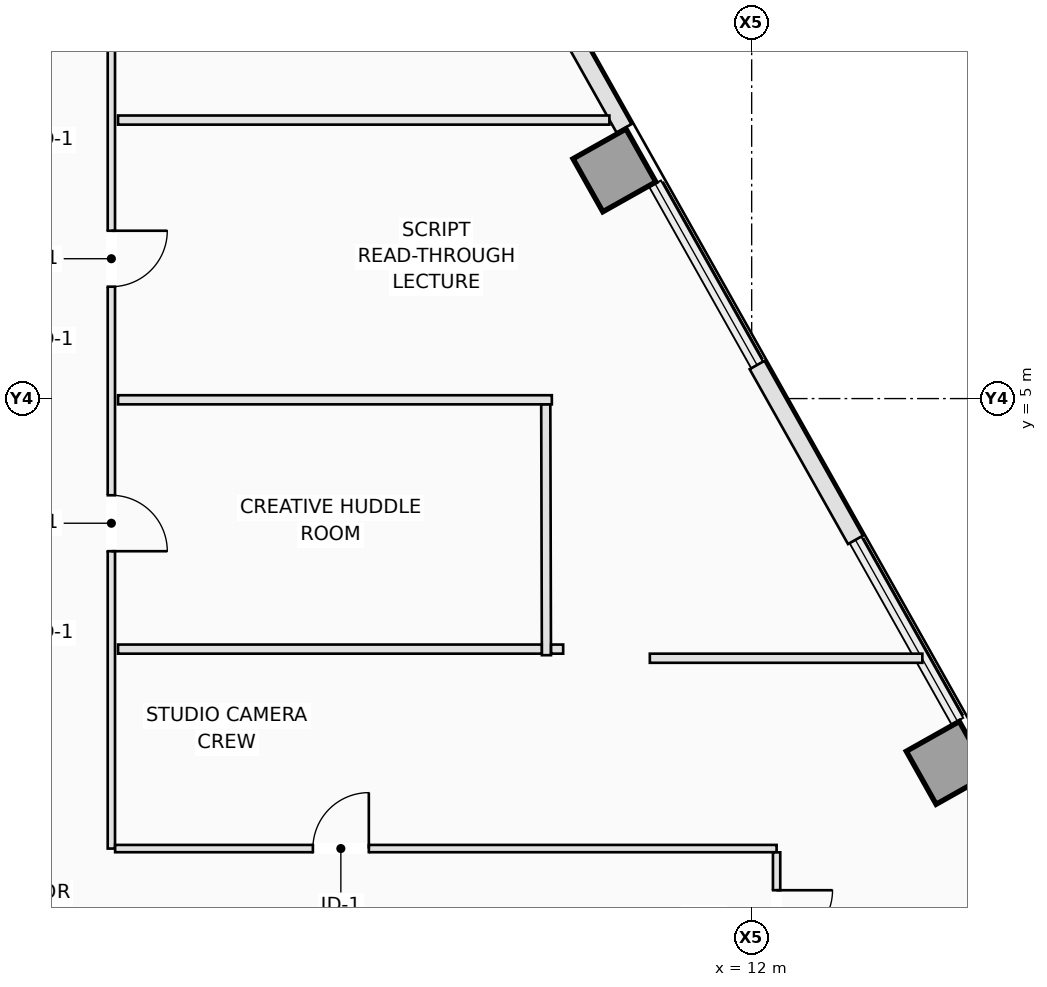
"""IFC4 building model, lengths in metres.
Left out: names, types, materials, properties, quantities, classifications, styles, units other than length and angle.
Written with IfcOpenShell. Run it as: python <this file> out.ifc"""

import sys

from ifc_helpers import new_model, si_unit, direction, frame, frame_2d, origin, origin_2d, place, context, subcontext, project, spatial, rectangle, extrude, element, fill, save


model = new_model("IFC4")
c1 = context("Model", 3, precision=1e-05, world=origin(), true_north=direction((0.0, 1.0)))
c2 = subcontext(c1, "Body", "Model", "MODEL_VIEW")
j1 = project(units=[si_unit("LENGTHUNIT", "METRE"), si_unit("PLANEANGLEUNIT", "RADIAN")], contexts=[c1])
p1 = place(None, origin())
s1 = spatial("IfcSite", under=j1, at=p1, CompositionType="ELEMENT")
p2 = place(p1, origin())
s2 = spatial("IfcBuilding", under=s1, at=p2, CompositionType="ELEMENT")
p3 = place(p2, frame((0.0, 0.0, 133.5)))
s3 = spatial("IfcBuildingStorey", under=s2, at=p3, CompositionType="ELEMENT", Elevation=133.5)
for number, where, z_axis, x_axis in (
    (1, (15.224, -0.991, 0.0), (0.0, 0.0, 1.0), (0.872, 0.49, 0.0)),
    (2, (9.743, 8.753, 0.0), (0.0, 0.0, 1.0), (0.872, 0.49, 0.0)),
):
    element("IfcColumn", number, at=place(p3, frame(where, z_axis=z_axis, x_axis=x_axis)), inside=s3, PredefinedType="COLUMN", context=c2, shape_type="SweptSolid", body=[
        extrude(rectangle(XDim=1.0, YDim=1.0, at=origin_2d()), origin(), (0.0, 0.0, 1.0), 3.5),
    ])
p4 = place(p3, frame((8.641, 11.682, 0.0), z_axis=(0.0, 0.0, 1.0), x_axis=(0.490301864627, -0.871552684319, 0.0)))
e3 = element("IfcWall", 3, at=p4, inside=s3, PredefinedType="STANDARD", context=c2, shape_type="SweptSolid", body=[
    extrude(rectangle(XDim=2.568, YDim=0.28, at=frame_2d((1.284, 0.0))), origin(), (0.0, 0.0, 1.0), 3.25),
])
p5 = place(p3, frame((12.089, 5.552, 0.0), z_axis=(0.0, 0.0, 1.0), x_axis=(0.490285834707, -0.871561701938, 0.0)))
e4 = element("IfcWall", 4, at=p5, inside=s3, PredefinedType="STANDARD", context=c2, shape_type="SweptSolid", body=[
    extrude(rectangle(XDim=3.299, YDim=0.28, at=frame_2d((1.649, 0.0))), origin(), (0.0, 0.0, 1.0), 3.25),
])
p6 = place(p3, frame((1.47, 11.088, 0.0), z_axis=(0.0, 0.0, 1.0), x_axis=(0.0, -1.0, 0.0)))
e5 = element("IfcWall", 5, at=p6, inside=s3, PredefinedType="PARTITIONING", context=c2, shape_type="SweptSolid", body=[
    extrude(rectangle(XDim=13.488, YDim=0.12, at=frame_2d((6.744, 0.0))), origin(), (0.0, 0.0, 1.0), 3.25),
])
p7 = place(p6, frame((3.328, 0.0, 0.0)))
e6 = element("IfcOpeningElement", 6, at=p7, cuts=e5, PredefinedType="OPENING", context=c2, shape_type="SweptSolid", body=[
    extrude(rectangle(XDim=0.92, YDim=2.12, at=frame_2d((0.46, 1.06))), frame((0.0, 0.07, 0.0), z_axis=(0.0, -1.0, 0.0), x_axis=(1.0, 0.0, 0.0)), (0.0, 0.0, 1.0), 0.14),
])
p8 = place(p6, frame((7.678, 0.0, 0.0)))
e7 = element("IfcOpeningElement", 7, at=p8, cuts=e5, PredefinedType="OPENING", context=c2, shape_type="SweptSolid", body=[
    extrude(rectangle(XDim=0.92, YDim=2.12, at=frame_2d((0.46, 1.06))), frame((0.0, 0.07, 0.0), z_axis=(0.0, -1.0, 0.0), x_axis=(1.0, 0.0, 0.0)), (0.0, 0.0, 1.0), 0.14),
])
p9 = place(p3, frame((1.532, -2.4, 0.0), z_axis=(0.0, 0.0, 1.0), x_axis=(1.0, 0.0, 0.0)))
e8 = element("IfcWall", 8, at=p9, inside=s3, PredefinedType="PARTITIONING", context=c2, shape_type="SweptSolid", body=[
    extrude(rectangle(XDim=10.878, YDim=0.12, at=frame_2d((5.439, 0.0))), origin(), (0.0, 0.0, 1.0), 2.891),
])
p10 = place(p9, frame((3.252, 0.0, 0.0)))
e9 = element("IfcOpeningElement", 9, at=p10, cuts=e8, PredefinedType="OPENING", context=c2, shape_type="SweptSolid", body=[
    extrude(rectangle(XDim=0.92, YDim=2.12, at=frame_2d((0.46, 1.06))), frame((0.0, 0.07, 0.0), z_axis=(0.0, -1.0, 0.0), x_axis=(1.0, 0.0, 0.0)), (0.0, 0.0, 1.0), 0.14),
])
p11 = place(p3, frame((12.41, -2.462, 0.0), z_axis=(0.0, 0.0, 1.0), x_axis=(0.0, -1.0, 0.0)))
e10 = element("IfcWall", 10, at=p11, inside=s3, PredefinedType="PARTITIONING", context=c2, shape_type="SweptSolid", body=[
    extrude(rectangle(XDim=1.786, YDim=0.12, at=frame_2d((0.893, 0.0))), origin(), (0.0, 0.0, 1.0), 3.25),
])
p12 = place(p11, frame((0.623, 0.0, 0.0)))
e11 = element("IfcOpeningElement", 11, at=p12, cuts=e10, PredefinedType="OPENING", context=c2, shape_type="SweptSolid", body=[
    extrude(rectangle(XDim=0.92, YDim=2.12, at=frame_2d((0.46, 1.06))), frame((0.0, 0.07, 0.0), z_axis=(0.0, -1.0, 0.0), x_axis=(1.0, 0.0, 0.0)), (0.0, 0.0, 1.0), 0.14),
])
p13 = place(p3, frame((9.66, 9.58, 0.0), z_axis=(0.0, 0.0, 1.0), x_axis=(-1.0, 0.0, 0.0)))
e12 = element("IfcWall", 12, at=p13, inside=s3, PredefinedType="PARTITIONING", context=c2, shape_type="SweptSolid", body=[
    extrude(rectangle(XDim=8.08, YDim=0.15, at=frame_2d((4.04, 0.0))), origin(), (0.0, 0.0, 1.0), 3.25),
])
p14 = place(p3, frame((8.714, 4.98, 0.0), z_axis=(0.0, 0.0, 1.0), x_axis=(-1.0, 0.0, 0.0)))
e13 = element("IfcWall", 13, at=p14, inside=s3, PredefinedType="PARTITIONING", context=c2, shape_type="SweptSolid", body=[
    extrude(rectangle(XDim=7.134, YDim=0.15, at=frame_2d((3.567, 0.0))), origin(), (0.0, 0.0, 1.0), 3.25),
])
p15 = place(p3, frame((8.625, 0.78, 0.0), z_axis=(0.0, 0.0, 1.0), x_axis=(-0.002664604467, 0.999996449935, 0.0)))
e14 = element("IfcWall", 14, at=p15, inside=s3, PredefinedType="PARTITIONING", context=c2, shape_type="SweptSolid", body=[
    extrude(rectangle(XDim=4.123, YDim=0.15, at=frame_2d((2.062, 0.0))), origin(), (0.0, 0.0, 1.0), 3.25),
])
p16 = place(p3, frame((14.807, 0.73, 0.0), z_axis=(0.0, 0.0, 1.0), x_axis=(-1.0, 0.0, 0.0)))
e15 = element("IfcWall", 15, at=p16, inside=s3, PredefinedType="PARTITIONING", context=c2, shape_type="SweptSolid", body=[
    extrude(rectangle(XDim=4.482, YDim=0.15, at=frame_2d((2.241, 0.0))), origin(), (0.0, 0.0, 1.0), 3.25),
])
p17 = place(p3, frame((8.9, 0.88, 0.0), z_axis=(0.0, 0.0, 1.0), x_axis=(-1.0, 0.0, 0.0)))
e16 = element("IfcWall", 16, at=p17, inside=s3, PredefinedType="PARTITIONING", context=c2, shape_type="SweptSolid", body=[
    extrude(rectangle(XDim=0.198, YDim=0.15, at=frame_2d((0.099, 0.0))), origin(), (0.0, 0.0, 1.0), 3.25),
])
p18 = place(p3, frame((8.548, 0.88, 0.0), z_axis=(0.0, 0.0, 1.0), x_axis=(-1.0, 0.0, 0.0)))
e17 = element("IfcWall", 17, at=p18, inside=s3, PredefinedType="PARTITIONING", context=c2, shape_type="SweptSolid", body=[
    extrude(rectangle(XDim=6.968, YDim=0.15, at=frame_2d((3.484, 0.0))), origin(), (0.0, 0.0, 1.0), 3.25),
])
p19 = place(p7, origin())
e18 = element("IfcDoor", 18, at=p19, inside=s3, OperationType="SINGLE_SWING_LEFT", PredefinedType="DOOR", context=c2, shape_type="SweptSolid", body=[
    extrude(rectangle(XDim=0.92, YDim=2.12, at=frame_2d((0.46, 1.06))), frame((0.0, 0.025, 0.0), z_axis=(0.0, -1.0, 0.0), x_axis=(1.0, 0.0, 0.0)), (0.0, 0.0, 1.0), 0.05),
])
fill(e6, e18)
p20 = place(p8, origin())
e19 = element("IfcDoor", 19, at=p20, inside=s3, OperationType="SINGLE_SWING_RIGHT", PredefinedType="DOOR", context=c2, shape_type="SweptSolid", body=[
    extrude(rectangle(XDim=0.92, YDim=2.12, at=frame_2d((0.46, 1.06))), frame((0.0, 0.025, 0.0), z_axis=(0.0, -1.0, 0.0), x_axis=(1.0, 0.0, 0.0)), (0.0, 0.0, 1.0), 0.05),
])
fill(e7, e19)
p21 = place(p10, origin())
e20 = element("IfcDoor", 20, at=p21, inside=s3, OperationType="SINGLE_SWING_RIGHT", PredefinedType="DOOR", context=c2, shape_type="SweptSolid", body=[
    extrude(rectangle(XDim=0.92, YDim=2.12, at=frame_2d((0.46, 1.06))), frame((0.0, 0.025, 0.0), z_axis=(0.0, -1.0, 0.0), x_axis=(1.0, 0.0, 0.0)), (0.0, 0.0, 1.0), 0.05),
])
fill(e9, e20)
p22 = place(p12, origin())
e21 = element("IfcDoor", 21, at=p22, inside=s3, OperationType="SINGLE_SWING_LEFT", PredefinedType="DOOR", context=c2, shape_type="SweptSolid", body=[
    extrude(rectangle(XDim=0.92, YDim=2.12, at=frame_2d((0.46, 1.06))), frame((0.0, 0.025, 0.0), z_axis=(0.0, -1.0, 0.0), x_axis=(1.0, 0.0, 0.0)), (0.0, 0.0, 1.0), 0.05),
])
fill(e11, e21)
save(model, sys.argv[1])
